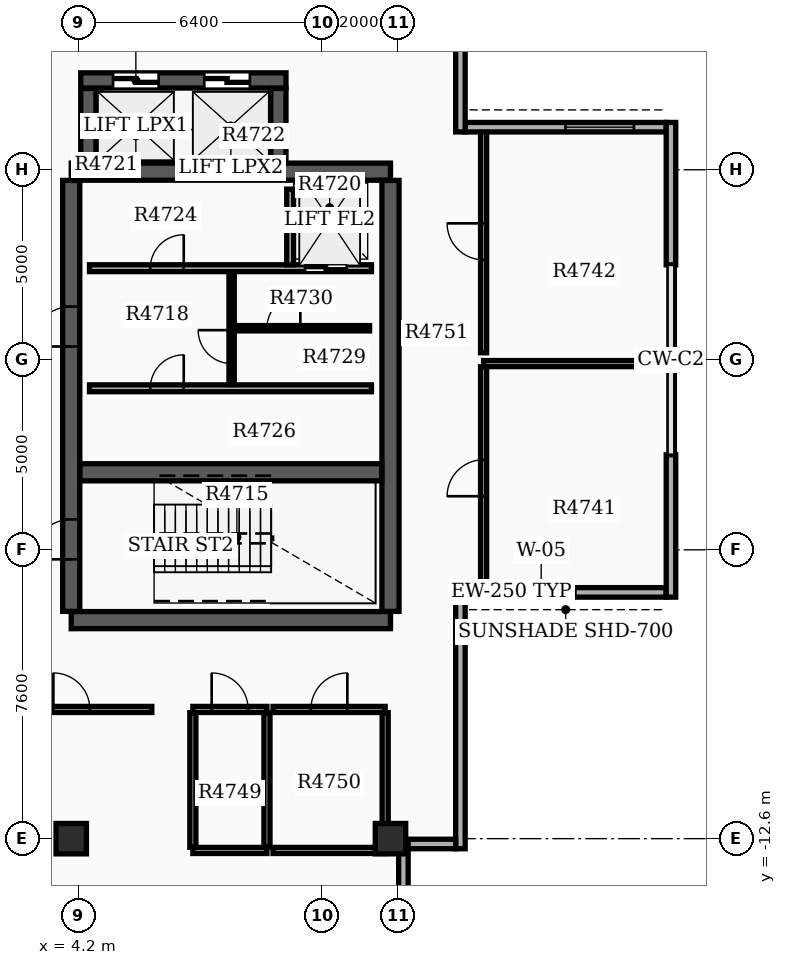
"""IFC4 building model, lengths in metres.
Left out: names, types, materials, properties, quantities, classifications, styles, units other than length and angle.
Written with IfcOpenShell. Run it as: python <this file> out.ifc"""

import sys

from ifc_helpers import new_model, si_unit, direction, frame, frame_2d, origin, origin_2d, place, context, subcontext, project, spatial, rectangle, extrude, element, fill, save


model = new_model("IFC4")
c1 = context("Model", 3, precision=1e-05, world=origin(), true_north=direction((0.0, 1.0)))
c2 = subcontext(c1, "Body", "Model", "MODEL_VIEW")
j1 = project(units=[si_unit("LENGTHUNIT", "METRE"), si_unit("PLANEANGLEUNIT", "RADIAN")], contexts=[c1])
p1 = place(None, origin())
s1 = spatial("IfcSite", under=j1, at=p1, CompositionType="ELEMENT")
p2 = place(p1, origin())
s2 = spatial("IfcBuilding", under=s1, at=p2, CompositionType="ELEMENT")
p3 = place(p2, frame((0.0, 0.0, 308.4)))
s3 = spatial("IfcBuildingStorey", under=s2, at=p3, CompositionType="ELEMENT", Elevation=308.4)
for number, where, z_axis, x_axis in (
    (1, (4.0, -6.85, 0.0), (0.0, 0.0, 1.0), (1.0, 0.0, 0.0)),
    (2, (4.0, 4.95, 0.0), (0.0, 0.0, 1.0), (1.0, 0.0, 0.0)),
):
    element("IfcWall", number, at=place(p3, frame(where, z_axis=z_axis, x_axis=x_axis)), inside=s3, PredefinedType="SHEAR", context=c2, shape_type="SweptSolid", body=[
        extrude(rectangle(XDim=8.4, YDim=0.45, at=frame_2d((4.2, 0.0))), origin(), (0.0, 0.0, 1.0), 4.25),
    ])
p4 = place(p3, frame((4.0, -6.62, 0.0), z_axis=(0.0, 0.0, 1.0), x_axis=(0.0, 1.0, 0.0)))
e3 = element("IfcWall", 3, at=p4, inside=s3, PredefinedType="SHEAR", context=c2, shape_type="SweptSolid", body=[
    extrude(rectangle(XDim=11.34, YDim=0.45, at=frame_2d((5.67, 0.0))), origin(), (0.0, 0.0, 1.0), 4.25),
])
p5 = place(p4, frame((1.37, 0.0, 0.0)))
e4 = element("IfcOpeningElement", 4, at=p5, cuts=e3, PredefinedType="OPENING", context=c2, shape_type="SweptSolid", body=[
    extrude(rectangle(XDim=1.05, YDim=2.15, at=frame_2d((0.525, 1.075))), frame((0.0, 0.235, 0.0), z_axis=(0.0, -1.0, 0.0), x_axis=(1.0, 0.0, 0.0)), (0.0, 0.0, 1.0), 0.47),
])
p6 = place(p4, frame((6.97, 0.0, 0.0)))
e5 = element("IfcOpeningElement", 5, at=p6, cuts=e3, PredefinedType="OPENING", context=c2, shape_type="SweptSolid", body=[
    extrude(rectangle(XDim=1.05, YDim=2.15, at=frame_2d((0.525, 1.075))), frame((0.0, 0.235, 0.0), z_axis=(0.0, -1.0, 0.0), x_axis=(1.0, 0.0, 0.0)), (0.0, 0.0, 1.0), 0.47),
])
p7 = place(p3, frame((12.4, -6.62, 0.0), z_axis=(0.0, 0.0, 1.0), x_axis=(0.0, 1.0, 0.0)))
e6 = element("IfcWall", 6, at=p7, inside=s3, PredefinedType="SHEAR", context=c2, shape_type="SweptSolid", body=[
    extrude(rectangle(XDim=11.34, YDim=0.45, at=frame_2d((5.67, 0.0))), origin(), (0.0, 0.0, 1.0), 4.25),
])
p8 = place(p3, frame((4.23, -2.96, 0.0), z_axis=(0.0, 0.0, 1.0), x_axis=(1.0, 0.0, 0.0)))
e7 = element("IfcWall", 7, at=p8, inside=s3, PredefinedType="SHEAR", context=c2, shape_type="SweptSolid", body=[
    extrude(rectangle(XDim=7.94, YDim=0.45, at=frame_2d((3.97, 0.0))), origin(), (0.0, 0.0, 1.0), 4.25),
])
p9 = place(p3, frame((4.45, 5.18, 0.0), z_axis=(0.0, 0.0, 1.0), x_axis=(0.0, 1.0, 0.0)))
e8 = element("IfcWall", 8, at=p9, inside=s3, PredefinedType="SHEAR", context=c2, shape_type="SweptSolid", body=[
    extrude(rectangle(XDim=1.96, YDim=0.4, at=frame_2d((0.98, 0.0))), origin(), (0.0, 0.0, 1.0), 4.25),
])
p10 = place(p3, frame((4.25, 7.35, 0.0), z_axis=(0.0, 0.0, 1.0), x_axis=(1.0, 0.0, 0.0)))
e9 = element("IfcWall", 9, at=p10, inside=s3, PredefinedType="SHEAR", context=c2, shape_type="SweptSolid", body=[
    extrude(rectangle(XDim=5.4, YDim=0.4, at=frame_2d((2.7, 0.0))), origin(), (0.0, 0.0, 1.0), 4.25),
])
p11 = place(p10, frame((0.85, 0.0, 0.0)))
e10 = element("IfcOpeningElement", 10, at=p11, cuts=e9, PredefinedType="OPENING", context=c2, shape_type="SweptSolid", body=[
    extrude(rectangle(XDim=1.2, YDim=2.2, at=frame_2d((0.6, 1.1))), frame((0.0, 0.21, 0.0), z_axis=(0.0, -1.0, 0.0), x_axis=(1.0, 0.0, 0.0)), (0.0, 0.0, 1.0), 0.42),
])
p12 = place(p10, frame((3.25, 0.0, 0.0)))
e11 = element("IfcOpeningElement", 11, at=p12, cuts=e9, PredefinedType="OPENING", context=c2, shape_type="SweptSolid", body=[
    extrude(rectangle(XDim=1.2, YDim=2.2, at=frame_2d((0.6, 1.1))), frame((0.0, 0.21, 0.0), z_axis=(0.0, -1.0, 0.0), x_axis=(1.0, 0.0, 0.0)), (0.0, 0.0, 1.0), 0.42),
])
p13 = place(p3, frame((9.45, 5.18, 0.0), z_axis=(0.0, 0.0, 1.0), x_axis=(0.0, 1.0, 0.0)))
e12 = element("IfcWall", 12, at=p13, inside=s3, PredefinedType="SHEAR", context=c2, shape_type="SweptSolid", body=[
    extrude(rectangle(XDim=1.96, YDim=0.4, at=frame_2d((0.98, 0.0))), origin(), (0.0, 0.0, 1.0), 4.25),
])
for number, where, z_axis, x_axis in (
    (13, (12.4, -12.6, 0.0), (0.0, 0.0, 1.0), (1.0, 0.0, 0.0)),
    (14, (4.0, -12.6, 0.0), (0.0, 0.0, 1.0), (1.0, 0.0, 0.0)),
):
    element("IfcColumn", number, at=place(p3, frame(where, z_axis=z_axis, x_axis=x_axis)), inside=s3, PredefinedType="COLUMN", context=c2, shape_type="SweptSolid", body=[
        extrude(rectangle(XDim=0.8, YDim=0.8, at=origin_2d()), origin(), (0.0, 0.0, 1.0), 4.5),
    ])
p14 = place(p3, frame((14.365, -6.12, 0.0), z_axis=(0.0, 0.0, 1.0), x_axis=(1.0, 0.0, 0.0)))
e15 = element("IfcWall", 15, at=p14, inside=s3, PredefinedType="STANDARD", context=c2, shape_type="SweptSolid", body=[
    extrude(rectangle(XDim=5.29, YDim=0.25, at=frame_2d((2.645, 0.0))), origin(), (0.0, 0.0, 1.0), 3.73),
])
p15 = place(p14, frame((1.1, 0.0, 0.8)))
e16 = element("IfcOpeningElement", 16, at=p15, cuts=e15, PredefinedType="OPENING", context=c2, shape_type="SweptSolid", body=[
    extrude(rectangle(XDim=1.8, YDim=1.8, at=frame_2d((0.9, 0.9))), frame((0.0, 0.135, 0.0), z_axis=(0.0, -1.0, 0.0), x_axis=(1.0, 0.0, 0.0)), (0.0, 0.0, 1.0), 0.27),
])
p16 = place(p3, frame((19.655, 6.12, 0.0), z_axis=(0.0, 0.0, 1.0), x_axis=(-1.0, 0.0, 0.0)))
e17 = element("IfcWall", 17, at=p16, inside=s3, PredefinedType="STANDARD", context=c2, shape_type="SweptSolid", body=[
    extrude(rectangle(XDim=5.29, YDim=0.25, at=frame_2d((2.645, 0.0))), origin(), (0.0, 0.0, 1.0), 3.73),
])
p17 = place(p16, frame((0.85, 0.0, 0.8)))
e18 = element("IfcOpeningElement", 18, at=p17, cuts=e17, PredefinedType="OPENING", context=c2, shape_type="SweptSolid", body=[
    extrude(rectangle(XDim=1.8, YDim=1.8, at=frame_2d((0.9, 0.9))), frame((0.0, 0.135, 0.0), z_axis=(0.0, -1.0, 0.0), x_axis=(1.0, 0.0, 0.0)), (0.0, 0.0, 1.0), 0.27),
])
for number, where, z_axis, x_axis in (
    (19, (19.78, -6.245, 0.0), (0.0, 0.0, 1.0), (0.0, 1.0, 0.0)),
    (20, (19.78, 2.498, 0.0), (0.0, 0.0, 1.0), (0.0, 1.0, 0.0)),
):
    element("IfcWall", number, at=place(p3, frame(where, z_axis=z_axis, x_axis=x_axis)), inside=s3, PredefinedType="STANDARD", context=c2, shape_type="SweptSolid", body=[
        extrude(rectangle(XDim=3.747, YDim=0.25, at=frame_2d((1.874, 0.0))), origin(), (0.0, 0.0, 1.0), 3.73),
    ])
for number, where, z_axis, x_axis in (
    (21, (14.24, 5.995, 0.0), (0.0, 0.0, 1.0), (0.0, 1.0, 0.0)),
    (22, (14.24, -5.995, 0.0), (0.0, 0.0, 1.0), (0.0, -1.0, 0.0)),
):
    element("IfcWall", number, at=place(p3, frame(where, z_axis=z_axis, x_axis=x_axis)), inside=s3, PredefinedType="STANDARD", context=c2, shape_type="SweptSolid", body=[
        extrude(rectangle(XDim=6.87, YDim=0.25, at=frame_2d((3.435, 0.0))), origin(), (0.0, 0.0, 1.0), 3.73),
    ])
p18 = place(p3, frame((14.115, -12.74, 0.0), z_axis=(0.0, 0.0, 1.0), x_axis=(-1.0, 0.0, 0.0)))
e23 = element("IfcWall", 23, at=p18, inside=s3, PredefinedType="STANDARD", context=c2, shape_type="SweptSolid", body=[
    extrude(rectangle(XDim=1.25, YDim=0.25, at=frame_2d((0.625, 0.0))), origin(), (0.0, 0.0, 1.0), 3.73),
])
p19 = place(p3, frame((12.74, -12.865, 0.0), z_axis=(0.0, 0.0, 1.0), x_axis=(0.0, -1.0, 0.0)))
e24 = element("IfcWall", 24, at=p19, inside=s3, PredefinedType="STANDARD", context=c2, shape_type="SweptSolid", body=[
    extrude(rectangle(XDim=1.5, YDim=0.25, at=frame_2d((0.75, 0.0))), origin(), (0.0, 0.0, 1.0), 3.73),
])
p20 = place(p3, frame((4.48, 2.41, 0.0), z_axis=(0.0, 0.0, 1.0), x_axis=(1.0, 0.0, 0.0)))
e25 = element("IfcWall", 25, at=p20, inside=s3, PredefinedType="SOLIDWALL", context=c2, shape_type="SweptSolid", body=[
    extrude(rectangle(XDim=7.42, YDim=0.18, at=frame_2d((3.71, 0.0))), origin(), (0.0, 0.0, 1.0), 3.72),
])
p21 = place(p20, frame((5.67, 0.0, 0.0)))
e26 = element("IfcOpeningElement", 26, at=p21, cuts=e25, PredefinedType="OPENING", context=c2, shape_type="SweptSolid", body=[
    extrude(rectangle(XDim=1.1, YDim=2.15, at=frame_2d((0.55, 1.075))), frame((0.0, 0.1, 0.0), z_axis=(0.0, -1.0, 0.0), x_axis=(1.0, 0.0, 0.0)), (0.0, 0.0, 1.0), 0.2),
])
p22 = place(p20, frame((1.6, 0.0, 0.0)))
e27 = element("IfcOpeningElement", 27, at=p22, cuts=e25, PredefinedType="OPENING", context=c2, shape_type="SweptSolid", body=[
    extrude(rectangle(XDim=0.88, YDim=2.1, at=frame_2d((0.44, 1.05))), frame((0.0, 0.1, 0.0), z_axis=(0.0, -1.0, 0.0), x_axis=(1.0, 0.0, 0.0)), (0.0, 0.0, 1.0), 0.2),
])
p23 = place(p3, frame((4.48, -0.75, 0.0), z_axis=(0.0, 0.0, 1.0), x_axis=(1.0, 0.0, 0.0)))
e28 = element("IfcWall", 28, at=p23, inside=s3, PredefinedType="SOLIDWALL", context=c2, shape_type="SweptSolid", body=[
    extrude(rectangle(XDim=7.42, YDim=0.18, at=frame_2d((3.71, 0.0))), origin(), (0.0, 0.0, 1.0), 3.72),
])
p24 = place(p23, frame((1.6, 0.0, 0.0)))
e29 = element("IfcOpeningElement", 29, at=p24, cuts=e28, PredefinedType="OPENING", context=c2, shape_type="SweptSolid", body=[
    extrude(rectangle(XDim=0.88, YDim=2.1, at=frame_2d((0.44, 1.05))), frame((0.0, 0.1, 0.0), z_axis=(0.0, -1.0, 0.0), x_axis=(1.0, 0.0, 0.0)), (0.0, 0.0, 1.0), 0.2),
])
p25 = place(p3, frame((9.76, 2.5, 0.0), z_axis=(0.0, 0.0, 1.0), x_axis=(0.0, 1.0, 0.0)))
e30 = element("IfcWall", 30, at=p25, inside=s3, PredefinedType="SOLIDWALL", context=c2, shape_type="SweptSolid", body=[
    extrude(rectangle(XDim=1.99, YDim=0.18, at=frame_2d((0.995, 0.0))), origin(), (0.0, 0.0, 1.0), 3.72),
])
p26 = place(p3, frame((8.22, -0.65, 0.0), z_axis=(0.0, 0.0, 1.0), x_axis=(0.0, 1.0, 0.0)))
e31 = element("IfcWall", 31, at=p26, inside=s3, PredefinedType="SOLIDWALL", context=c2, shape_type="SweptSolid", body=[
    extrude(rectangle(XDim=2.96, YDim=0.14, at=frame_2d((1.48, 0.0))), origin(), (0.0, 0.0, 1.0), 3.72),
])
p27 = place(p26, frame((0.55, 0.0, 0.0)))
e32 = element("IfcOpeningElement", 32, at=p27, cuts=e31, PredefinedType="OPENING", context=c2, shape_type="SweptSolid", body=[
    extrude(rectangle(XDim=0.88, YDim=2.1, at=frame_2d((0.44, 1.05))), frame((0.0, 0.08, 0.0), z_axis=(0.0, -1.0, 0.0), x_axis=(1.0, 0.0, 0.0)), (0.0, 0.0, 1.0), 0.16),
])
p28 = place(p3, frame((8.298, 0.83, 0.0), z_axis=(0.0, 0.0, 1.0), x_axis=(1.0, 0.0, 0.0)))
e33 = element("IfcWall", 33, at=p28, inside=s3, PredefinedType="PARTITIONING", context=c2, shape_type="SweptSolid", body=[
    extrude(rectangle(XDim=3.552, YDim=0.14, at=frame_2d((1.776, 0.0))), origin(), (0.0, 0.0, 1.0), 3.72),
])
p29 = place(p28, frame((0.85, 0.0, 0.0)))
e34 = element("IfcOpeningElement", 34, at=p29, cuts=e33, PredefinedType="OPENING", context=c2, shape_type="SweptSolid", body=[
    extrude(rectangle(XDim=0.88, YDim=2.1, at=frame_2d((0.44, 1.05))), frame((0.0, 0.08, 0.0), z_axis=(0.0, -1.0, 0.0), x_axis=(1.0, 0.0, 0.0)), (0.0, 0.0, 1.0), 0.16),
])
p30 = place(p3, frame((1.9, -9.2, 0.0), z_axis=(0.0, 0.0, 1.0), x_axis=(1.0, 0.0, 0.0)))
e35 = element("IfcWall", 35, at=p30, inside=s3, PredefinedType="PARTITIONING", context=c2, shape_type="SweptSolid", body=[
    extrude(rectangle(XDim=4.22, YDim=0.16, at=frame_2d((2.11, 0.0))), origin(), (0.0, 0.0, 1.0), 3.72),
])
p31 = place(p30, frame((1.63, 0.0, 0.0)))
e36 = element("IfcOpeningElement", 36, at=p31, cuts=e35, PredefinedType="OPENING", context=c2, shape_type="SweptSolid", body=[
    extrude(rectangle(XDim=0.96, YDim=2.15, at=frame_2d((0.48, 1.075))), frame((0.0, 0.09, 0.0), z_axis=(0.0, -1.0, 0.0), x_axis=(1.0, 0.0, 0.0)), (0.0, 0.0, 1.0), 0.18),
])
p32 = place(p3, frame((14.85, -0.1, 0.0), z_axis=(0.0, 0.0, 1.0), x_axis=(1.0, 0.0, 0.0)))
e37 = element("IfcWall", 37, at=p32, inside=s3, PredefinedType="PARTITIONING", context=c2, shape_type="SweptSolid", body=[
    extrude(rectangle(XDim=4.93, YDim=0.16, at=frame_2d((2.465, 0.0))), origin(), (0.0, 0.0, 1.0), 3.72),
])
p33 = place(p3, frame((14.85, -5.987, 0.0), z_axis=(0.0, 0.0, 1.0), x_axis=(0.0, 1.0, 0.0)))
e38 = element("IfcWall", 38, at=p33, inside=s3, PredefinedType="PARTITIONING", context=c2, shape_type="SweptSolid", body=[
    extrude(rectangle(XDim=5.802, YDim=0.16, at=frame_2d((2.901, 0.0))), origin(), (0.0, 0.0, 1.0), 3.72),
])
p34 = place(p33, frame((2.397, 0.0, 0.0)))
e39 = element("IfcOpeningElement", 39, at=p34, cuts=e38, PredefinedType="OPENING", context=c2, shape_type="SweptSolid", body=[
    extrude(rectangle(XDim=0.96, YDim=2.15, at=frame_2d((0.48, 1.075))), frame((0.0, 0.09, 0.0), z_axis=(0.0, -1.0, 0.0), x_axis=(1.0, 0.0, 0.0)), (0.0, 0.0, 1.0), 0.18),
])
p35 = place(p3, frame((14.85, 0.185, 0.0), z_axis=(0.0, 0.0, 1.0), x_axis=(0.0, 1.0, 0.0)))
e40 = element("IfcWall", 40, at=p35, inside=s3, PredefinedType="PARTITIONING", context=c2, shape_type="SweptSolid", body=[
    extrude(rectangle(XDim=5.802, YDim=0.16, at=frame_2d((2.901, 0.0))), origin(), (0.0, 0.0, 1.0), 3.72),
])
p36 = place(p35, frame((2.445, 0.0, 0.0)))
e41 = element("IfcOpeningElement", 41, at=p36, cuts=e40, PredefinedType="OPENING", context=c2, shape_type="SweptSolid", body=[
    extrude(rectangle(XDim=0.96, YDim=2.15, at=frame_2d((0.48, 1.075))), frame((0.0, 0.09, 0.0), z_axis=(0.0, -1.0, 0.0), x_axis=(1.0, 0.0, 0.0)), (0.0, 0.0, 1.0), 0.18),
])
p37 = place(p3, frame((7.2, -12.91, 0.0), z_axis=(0.0, 0.0, 1.0), x_axis=(1.0, 0.0, 0.0)))
e42 = element("IfcWall", 42, at=p37, inside=s3, PredefinedType="PARTITIONING", context=c2, shape_type="SweptSolid", body=[
    extrude(rectangle(XDim=1.95, YDim=0.16, at=frame_2d((0.975, 0.0))), origin(), (0.0, 0.0, 1.0), 3.72),
])
p38 = place(p3, frame((7.2, -9.2, 0.0), z_axis=(0.0, 0.0, 1.0), x_axis=(1.0, 0.0, 0.0)))
e43 = element("IfcWall", 43, at=p38, inside=s3, PredefinedType="PARTITIONING", context=c2, shape_type="SweptSolid", body=[
    extrude(rectangle(XDim=1.95, YDim=0.16, at=frame_2d((0.975, 0.0))), origin(), (0.0, 0.0, 1.0), 3.72),
])
p39 = place(p38, frame((0.495, 0.0, 0.0)))
e44 = element("IfcOpeningElement", 44, at=p39, cuts=e43, PredefinedType="OPENING", context=c2, shape_type="SweptSolid", body=[
    extrude(rectangle(XDim=0.96, YDim=2.15, at=frame_2d((0.48, 1.075))), frame((0.0, 0.09, 0.0), z_axis=(0.0, -1.0, 0.0), x_axis=(1.0, 0.0, 0.0)), (0.0, 0.0, 1.0), 0.18),
])
for number, where, z_axis, x_axis in (
    (45, (7.2, -12.825, 0.0), (0.0, 0.0, 1.0), (0.0, 1.0, 0.0)),
    (46, (9.15, -12.825, 0.0), (0.0, 0.0, 1.0), (0.0, 1.0, 0.0)),
):
    element("IfcWall", number, at=place(p3, frame(where, z_axis=z_axis, x_axis=x_axis)), inside=s3, PredefinedType="PARTITIONING", context=c2, shape_type="SweptSolid", body=[
        extrude(rectangle(XDim=3.54, YDim=0.16, at=frame_2d((1.77, 0.0))), origin(), (0.0, 0.0, 1.0), 3.72),
    ])
p40 = place(p3, frame((9.31, -12.91, 0.0), z_axis=(0.0, 0.0, 1.0), x_axis=(1.0, 0.0, 0.0)))
e47 = element("IfcWall", 47, at=p40, inside=s3, PredefinedType="PARTITIONING", context=c2, shape_type="SweptSolid", body=[
    extrude(rectangle(XDim=2.95, YDim=0.16, at=frame_2d((1.475, 0.0))), origin(), (0.0, 0.0, 1.0), 3.72),
])
p41 = place(p3, frame((9.31, -9.2, 0.0), z_axis=(0.0, 0.0, 1.0), x_axis=(1.0, 0.0, 0.0)))
e48 = element("IfcWall", 48, at=p41, inside=s3, PredefinedType="PARTITIONING", context=c2, shape_type="SweptSolid", body=[
    extrude(rectangle(XDim=2.95, YDim=0.16, at=frame_2d((1.475, 0.0))), origin(), (0.0, 0.0, 1.0), 3.72),
])
p42 = place(p41, frame((0.995, 0.0, 0.0)))
e49 = element("IfcOpeningElement", 49, at=p42, cuts=e48, PredefinedType="OPENING", context=c2, shape_type="SweptSolid", body=[
    extrude(rectangle(XDim=0.96, YDim=2.15, at=frame_2d((0.48, 1.075))), frame((0.0, 0.09, 0.0), z_axis=(0.0, -1.0, 0.0), x_axis=(1.0, 0.0, 0.0)), (0.0, 0.0, 1.0), 0.18),
])
p43 = place(p3, frame((12.26, -12.825, 0.0), z_axis=(0.0, 0.0, 1.0), x_axis=(0.0, 1.0, 0.0)))
e50 = element("IfcWall", 50, at=p43, inside=s3, PredefinedType="PARTITIONING", context=c2, shape_type="SweptSolid", body=[
    extrude(rectangle(XDim=3.54, YDim=0.16, at=frame_2d((1.77, 0.0))), origin(), (0.0, 0.0, 1.0), 3.72),
])
p44 = place(p15, origin())
e51 = element("IfcWindow", 51, at=p44, inside=s3, PartitioningType="SINGLE_PANEL", PredefinedType="WINDOW", context=c2, shape_type="SweptSolid", body=[
    extrude(rectangle(XDim=1.8, YDim=1.8, at=frame_2d((0.9, 0.9))), frame((0.0, 0.03, 0.0), z_axis=(0.0, -1.0, 0.0), x_axis=(1.0, 0.0, 0.0)), (0.0, 0.0, 1.0), 0.06),
])
fill(e16, e51)
p45 = place(p17, origin())
e52 = element("IfcWindow", 52, at=p45, inside=s3, PartitioningType="SINGLE_PANEL", PredefinedType="WINDOW", context=c2, shape_type="SweptSolid", body=[
    extrude(rectangle(XDim=1.8, YDim=1.8, at=frame_2d((0.9, 0.9))), frame((0.0, 0.03, 0.0), z_axis=(0.0, -1.0, 0.0), x_axis=(1.0, 0.0, 0.0)), (0.0, 0.0, 1.0), 0.06),
])
fill(e18, e52)
p46 = place(p5, origin())
e53 = element("IfcDoor", 53, at=p46, inside=s3, OperationType="SINGLE_SWING_LEFT", PredefinedType="DOOR", context=c2, shape_type="SweptSolid", body=[
    extrude(rectangle(XDim=1.05, YDim=2.15, at=frame_2d((0.525, 1.075))), frame((0.0, 0.025, 0.0), z_axis=(0.0, -1.0, 0.0), x_axis=(1.0, 0.0, 0.0)), (0.0, 0.0, 1.0), 0.05),
])
fill(e4, e53)
p47 = place(p6, origin())
e54 = element("IfcDoor", 54, at=p47, inside=s3, OperationType="SINGLE_SWING_LEFT", PredefinedType="DOOR", context=c2, shape_type="SweptSolid", body=[
    extrude(rectangle(XDim=1.05, YDim=2.15, at=frame_2d((0.525, 1.075))), frame((0.0, 0.025, 0.0), z_axis=(0.0, -1.0, 0.0), x_axis=(1.0, 0.0, 0.0)), (0.0, 0.0, 1.0), 0.05),
])
fill(e5, e54)
p48 = place(p21, origin())
e55 = element("IfcDoor", 55, at=p48, inside=s3, OperationType="DOUBLE_DOOR_SLIDING", PredefinedType="DOOR", context=c2, shape_type="SweptSolid", body=[
    extrude(rectangle(XDim=1.1, YDim=2.15, at=frame_2d((0.55, 1.075))), frame((0.0, 0.025, 0.0), z_axis=(0.0, -1.0, 0.0), x_axis=(1.0, 0.0, 0.0)), (0.0, 0.0, 1.0), 0.05),
])
fill(e26, e55)
p49 = place(p11, origin())
e56 = element("IfcDoor", 56, at=p49, inside=s3, OperationType="DOUBLE_DOOR_SLIDING", PredefinedType="DOOR", context=c2, shape_type="SweptSolid", body=[
    extrude(rectangle(XDim=1.2, YDim=2.2, at=frame_2d((0.6, 1.1))), frame((0.0, 0.025, 0.0), z_axis=(0.0, -1.0, 0.0), x_axis=(1.0, 0.0, 0.0)), (0.0, 0.0, 1.0), 0.05),
])
fill(e10, e56)
p50 = place(p12, origin())
e57 = element("IfcDoor", 57, at=p50, inside=s3, OperationType="DOUBLE_DOOR_SLIDING", PredefinedType="DOOR", context=c2, shape_type="SweptSolid", body=[
    extrude(rectangle(XDim=1.2, YDim=2.2, at=frame_2d((0.6, 1.1))), frame((0.0, 0.025, 0.0), z_axis=(0.0, -1.0, 0.0), x_axis=(1.0, 0.0, 0.0)), (0.0, 0.0, 1.0), 0.05),
])
fill(e11, e57)
p51 = place(p22, origin())
e58 = element("IfcDoor", 58, at=p51, inside=s3, OperationType="SINGLE_SWING_RIGHT", PredefinedType="DOOR", context=c2, shape_type="SweptSolid", body=[
    extrude(rectangle(XDim=0.88, YDim=2.1, at=frame_2d((0.44, 1.05))), frame((0.0, 0.025, 0.0), z_axis=(0.0, -1.0, 0.0), x_axis=(1.0, 0.0, 0.0)), (0.0, 0.0, 1.0), 0.05),
])
fill(e27, e58)
p52 = place(p24, origin())
e59 = element("IfcDoor", 59, at=p52, inside=s3, OperationType="SINGLE_SWING_RIGHT", PredefinedType="DOOR", context=c2, shape_type="SweptSolid", body=[
    extrude(rectangle(XDim=0.88, YDim=2.1, at=frame_2d((0.44, 1.05))), frame((0.0, 0.025, 0.0), z_axis=(0.0, -1.0, 0.0), x_axis=(1.0, 0.0, 0.0)), (0.0, 0.0, 1.0), 0.05),
])
fill(e29, e59)
p53 = place(p27, origin())
e60 = element("IfcDoor", 60, at=p53, inside=s3, OperationType="SINGLE_SWING_RIGHT", PredefinedType="DOOR", context=c2, shape_type="SweptSolid", body=[
    extrude(rectangle(XDim=0.88, YDim=2.1, at=frame_2d((0.44, 1.05))), frame((0.0, 0.025, 0.0), z_axis=(0.0, -1.0, 0.0), x_axis=(1.0, 0.0, 0.0)), (0.0, 0.0, 1.0), 0.05),
])
fill(e32, e60)
p54 = place(p29, origin())
e61 = element("IfcDoor", 61, at=p54, inside=s3, OperationType="SINGLE_SWING_RIGHT", PredefinedType="DOOR", context=c2, shape_type="SweptSolid", body=[
    extrude(rectangle(XDim=0.88, YDim=2.1, at=frame_2d((0.44, 1.05))), frame((0.0, 0.025, 0.0), z_axis=(0.0, -1.0, 0.0), x_axis=(1.0, 0.0, 0.0)), (0.0, 0.0, 1.0), 0.05),
])
fill(e34, e61)
p55 = place(p31, origin())
e62 = element("IfcDoor", 62, at=p55, inside=s3, OperationType="SINGLE_SWING_LEFT", PredefinedType="DOOR", context=c2, shape_type="SweptSolid", body=[
    extrude(rectangle(XDim=0.96, YDim=2.15, at=frame_2d((0.48, 1.075))), frame((0.0, 0.025, 0.0), z_axis=(0.0, -1.0, 0.0), x_axis=(1.0, 0.0, 0.0)), (0.0, 0.0, 1.0), 0.05),
])
fill(e36, e62)
p56 = place(p34, origin())
e63 = element("IfcDoor", 63, at=p56, inside=s3, OperationType="SINGLE_SWING_LEFT", PredefinedType="DOOR", context=c2, shape_type="SweptSolid", body=[
    extrude(rectangle(XDim=0.96, YDim=2.15, at=frame_2d((0.48, 1.075))), frame((0.0, 0.025, 0.0), z_axis=(0.0, -1.0, 0.0), x_axis=(1.0, 0.0, 0.0)), (0.0, 0.0, 1.0), 0.05),
])
fill(e39, e63)
p57 = place(p36, origin())
e64 = element("IfcDoor", 64, at=p57, inside=s3, OperationType="SINGLE_SWING_RIGHT", PredefinedType="DOOR", context=c2, shape_type="SweptSolid", body=[
    extrude(rectangle(XDim=0.96, YDim=2.15, at=frame_2d((0.48, 1.075))), frame((0.0, 0.025, 0.0), z_axis=(0.0, -1.0, 0.0), x_axis=(1.0, 0.0, 0.0)), (0.0, 0.0, 1.0), 0.05),
])
fill(e41, e64)
p58 = place(p39, origin())
e65 = element("IfcDoor", 65, at=p58, inside=s3, OperationType="SINGLE_SWING_LEFT", PredefinedType="DOOR", context=c2, shape_type="SweptSolid", body=[
    extrude(rectangle(XDim=0.96, YDim=2.15, at=frame_2d((0.48, 1.075))), frame((0.0, 0.025, 0.0), z_axis=(0.0, -1.0, 0.0), x_axis=(1.0, 0.0, 0.0)), (0.0, 0.0, 1.0), 0.05),
])
fill(e44, e65)
p59 = place(p42, origin())
e66 = element("IfcDoor", 66, at=p59, inside=s3, OperationType="SINGLE_SWING_RIGHT", PredefinedType="DOOR", context=c2, shape_type="SweptSolid", body=[
    extrude(rectangle(XDim=0.96, YDim=2.15, at=frame_2d((0.48, 1.075))), frame((0.0, 0.025, 0.0), z_axis=(0.0, -1.0, 0.0), x_axis=(1.0, 0.0, 0.0)), (0.0, 0.0, 1.0), 0.05),
])
fill(e49, e66)
save(model, sys.argv[1])
